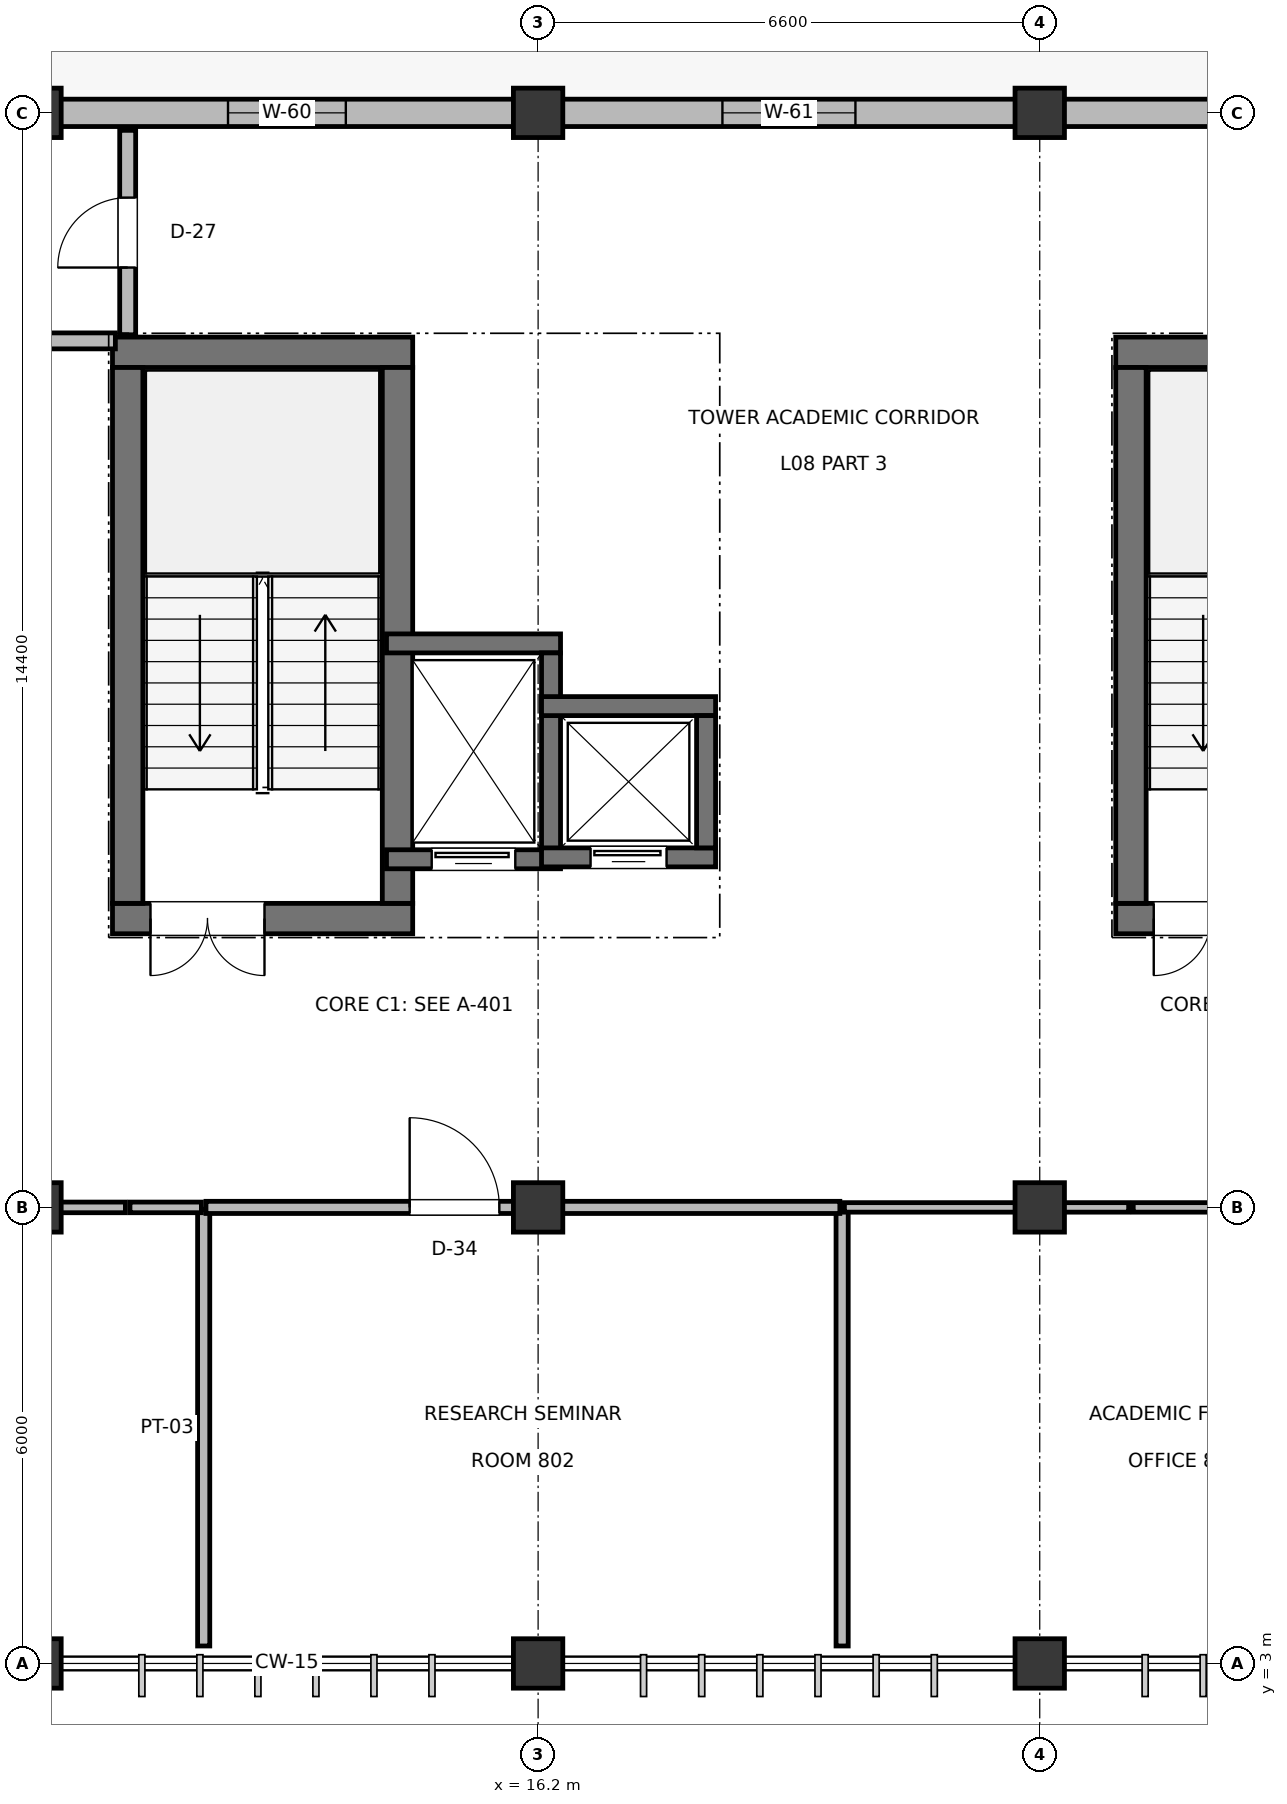
"""IFC4 building model, lengths in metres.
Left out: names, types, materials, properties, quantities, classifications, styles, units other than length and angle.
Written with IfcOpenShell. Run it as: python <this file> out.ifc"""

import sys

from ifc_helpers import new_model, si_unit, direction, frame, frame_2d, origin, origin_2d, place, context, subcontext, project, spatial, rectangle, extrude, element, fill, save


model = new_model("IFC4")
c1 = context("Model", 3, precision=1e-05, world=origin(), true_north=direction((0.0, 1.0)))
c2 = subcontext(c1, "Body", "Model", "MODEL_VIEW")
j1 = project(units=[si_unit("LENGTHUNIT", "METRE"), si_unit("PLANEANGLEUNIT", "RADIAN")], contexts=[c1])
p1 = place(None, origin())
s1 = spatial("IfcSite", under=j1, at=p1, CompositionType="ELEMENT")
p2 = place(p1, origin())
s2 = spatial("IfcBuilding", under=s1, at=p2, CompositionType="ELEMENT")
p3 = place(p2, frame((0.0, 0.0, 36.8)))
s3 = spatial("IfcBuildingStorey", under=s2, at=p3, CompositionType="ELEMENT", Elevation=36.8)
for number, where, z_axis, x_axis in (
    (1, (9.6, 3.0, 0.0), (0.0, 0.0, 1.0), (1.0, 0.0, 0.0)),
    (2, (9.6, 9.0, 0.0), (0.0, 0.0, 1.0), (1.0, 0.0, 0.0)),
    (3, (9.6, 23.4, 0.0), (0.0, 0.0, 1.0), (1.0, 0.0, 0.0)),
    (4, (16.2, 3.0, 0.0), (0.0, 0.0, 1.0), (1.0, 0.0, 0.0)),
    (5, (16.2, 9.0, 0.0), (0.0, 0.0, 1.0), (1.0, 0.0, 0.0)),
    (6, (16.2, 23.4, 0.0), (0.0, 0.0, 1.0), (1.0, 0.0, 0.0)),
    (7, (22.8, 3.0, 0.0), (0.0, 0.0, 1.0), (1.0, 0.0, 0.0)),
    (8, (22.8, 9.0, 0.0), (0.0, 0.0, 1.0), (1.0, 0.0, 0.0)),
    (9, (22.8, 23.4, 0.0), (0.0, 0.0, 1.0), (1.0, 0.0, 0.0)),
):
    element("IfcColumn", number, at=place(p3, frame(where, z_axis=z_axis, x_axis=x_axis)), inside=s3, PredefinedType="COLUMN", context=c2, shape_type="SweptSolid", body=[
        extrude(rectangle(XDim=0.65, YDim=0.65, at=origin_2d()), origin(), (0.0, 0.0, 1.0), 3.8),
    ])
p4 = place(p3, frame((9.905, 23.4, 0.0), z_axis=(0.0, 0.0, 1.0), x_axis=(1.0, 0.0, 0.0)))
e10 = element("IfcWall", 10, at=p4, inside=s3, PredefinedType="SOLIDWALL", context=c2, shape_type="SweptSolid", body=[
    extrude(rectangle(XDim=5.98, YDim=0.36, at=frame_2d((2.99, 0.0))), origin(), (0.0, 0.0, 1.0), 2.825),
])
p5 = place(p4, frame((2.215, 0.0, 0.9)))
e11 = element("IfcOpeningElement", 11, at=p5, cuts=e10, PredefinedType="OPENING", context=c2, shape_type="SweptSolid", body=[
    extrude(rectangle(XDim=1.55, YDim=1.75, at=frame_2d((0.775, 0.875))), frame((0.0, 0.19, 0.0), z_axis=(0.0, -1.0, 0.0), x_axis=(1.0, 0.0, 0.0)), (0.0, 0.0, 1.0), 0.38),
])
p6 = place(p3, frame((16.505, 23.4, 0.0), z_axis=(0.0, 0.0, 1.0), x_axis=(1.0, 0.0, 0.0)))
e12 = element("IfcWall", 12, at=p6, inside=s3, PredefinedType="SOLIDWALL", context=c2, shape_type="SweptSolid", body=[
    extrude(rectangle(XDim=5.99, YDim=0.36, at=frame_2d((2.995, 0.0))), origin(), (0.0, 0.0, 1.0), 2.615),
])
p7 = place(p6, frame((2.12, 0.0, 0.9)))
e13 = element("IfcOpeningElement", 13, at=p7, cuts=e12, PredefinedType="OPENING", context=c2, shape_type="SweptSolid", body=[
    extrude(rectangle(XDim=1.75, YDim=1.15, at=frame_2d((0.875, 0.575))), frame((0.0, 0.19, 0.0), z_axis=(0.0, -1.0, 0.0), x_axis=(1.0, 0.0, 0.0)), (0.0, 0.0, 1.0), 0.38),
])
p8 = place(p3, frame((23.105, 23.4, 0.0), z_axis=(0.0, 0.0, 1.0), x_axis=(1.0, 0.0, 0.0)))
e14 = element("IfcWall", 14, at=p8, inside=s3, PredefinedType="SOLIDWALL", context=c2, shape_type="SweptSolid", body=[
    extrude(rectangle(XDim=5.98, YDim=0.36, at=frame_2d((2.99, 0.0))), origin(), (0.0, 0.0, 1.0), 2.825),
])
p9 = place(p8, frame((2.115, 0.0, 0.9)))
e15 = element("IfcOpeningElement", 15, at=p9, cuts=e14, PredefinedType="OPENING", context=c2, shape_type="SweptSolid", body=[
    extrude(rectangle(XDim=1.75, YDim=1.35, at=frame_2d((0.875, 0.675))), frame((0.0, 0.19, 0.0), z_axis=(0.0, -1.0, 0.0), x_axis=(1.0, 0.0, 0.0)), (0.0, 0.0, 1.0), 0.38),
])
p10 = place(p3, frame((10.6, 12.8, 0.0), z_axis=(0.0, 0.0, 1.0), x_axis=(1.0, 0.0, 0.0)))
e16 = element("IfcWall", 16, at=p10, inside=s3, PredefinedType="SHEAR", context=c2, shape_type="SweptSolid", body=[
    extrude(rectangle(XDim=3.95, YDim=0.4, at=frame_2d((1.975, 0.0))), origin(), (0.0, 0.0, 1.0), 3.58),
])
p11 = place(p10, frame((0.5, 0.0, 0.0)))
e17 = element("IfcOpeningElement", 17, at=p11, cuts=e16, PredefinedType="OPENING", context=c2, shape_type="SweptSolid", body=[
    extrude(rectangle(XDim=1.5, YDim=2.2, at=frame_2d((0.75, 1.1))), frame((0.0, 0.21, 0.0), z_axis=(0.0, -1.0, 0.0), x_axis=(1.0, 0.0, 0.0)), (0.0, 0.0, 1.0), 0.42),
])
p12 = place(p3, frame((10.6, 20.25, 0.0), z_axis=(0.0, 0.0, 1.0), x_axis=(1.0, 0.0, 0.0)))
e18 = element("IfcWall", 18, at=p12, inside=s3, PredefinedType="SHEAR", context=c2, shape_type="SweptSolid", body=[
    extrude(rectangle(XDim=3.95, YDim=0.4, at=frame_2d((1.975, 0.0))), origin(), (0.0, 0.0, 1.0), 3.58),
])
for number, where, z_axis, x_axis in (
    (19, (10.8, 13.0, 0.0), (0.0, 0.0, 1.0), (0.0, 1.0, 0.0)),
    (20, (14.35, 13.0, 0.0), (0.0, 0.0, 1.0), (0.0, 1.0, 0.0)),
):
    element("IfcWall", number, at=place(p3, frame(where, z_axis=z_axis, x_axis=x_axis)), inside=s3, PredefinedType="SHEAR", context=c2, shape_type="SweptSolid", body=[
        extrude(rectangle(XDim=7.05, YDim=0.4, at=frame_2d((3.525, 0.0))), origin(), (0.0, 0.0, 1.0), 3.58),
    ])
p13 = place(p3, frame((14.205, 13.58, 0.0), z_axis=(0.0, 0.0, 1.0), x_axis=(1.0, 0.0, 0.0)))
e21 = element("IfcWall", 21, at=p13, inside=s3, PredefinedType="SHEAR", context=c2, shape_type="SweptSolid", body=[
    extrude(rectangle(XDim=2.29, YDim=0.25, at=frame_2d((1.145, 0.0))), origin(), (0.0, 0.0, 1.0), 3.56),
])
p14 = place(p13, frame((0.595, 0.0, 0.0)))
e22 = element("IfcOpeningElement", 22, at=p14, cuts=e21, PredefinedType="OPENING", context=c2, shape_type="SweptSolid", body=[
    extrude(rectangle(XDim=1.1, YDim=2.2, at=frame_2d((0.55, 1.1))), frame((0.0, 0.135, 0.0), z_axis=(0.0, -1.0, 0.0), x_axis=(1.0, 0.0, 0.0)), (0.0, 0.0, 1.0), 0.27),
])
p15 = place(p3, frame((14.205, 16.42, 0.0), z_axis=(0.0, 0.0, 1.0), x_axis=(1.0, 0.0, 0.0)))
e23 = element("IfcWall", 23, at=p15, inside=s3, PredefinedType="SHEAR", context=c2, shape_type="SweptSolid", body=[
    extrude(rectangle(XDim=2.29, YDim=0.25, at=frame_2d((1.145, 0.0))), origin(), (0.0, 0.0, 1.0), 3.56),
])
p16 = place(p3, frame((16.37, 13.705, 0.0), z_axis=(0.0, 0.0, 1.0), x_axis=(0.0, 1.0, 0.0)))
e24 = element("IfcWall", 24, at=p16, inside=s3, PredefinedType="SHEAR", context=c2, shape_type="SweptSolid", body=[
    extrude(rectangle(XDim=2.59, YDim=0.25, at=frame_2d((1.295, 0.0))), origin(), (0.0, 0.0, 1.0), 3.56),
])
p17 = place(p3, frame((16.245, 13.605, 0.0), z_axis=(0.0, 0.0, 1.0), x_axis=(1.0, 0.0, 0.0)))
e25 = element("IfcWall", 25, at=p17, inside=s3, PredefinedType="SHEAR", context=c2, shape_type="SweptSolid", body=[
    extrude(rectangle(XDim=2.29, YDim=0.25, at=frame_2d((1.145, 0.0))), origin(), (0.0, 0.0, 1.0), 3.56),
])
p18 = place(p17, frame((0.645, 0.0, 0.0)))
e26 = element("IfcOpeningElement", 26, at=p18, cuts=e25, PredefinedType="OPENING", context=c2, shape_type="SweptSolid", body=[
    extrude(rectangle(XDim=1.0, YDim=2.15, at=frame_2d((0.5, 1.075))), frame((0.0, 0.135, 0.0), z_axis=(0.0, -1.0, 0.0), x_axis=(1.0, 0.0, 0.0)), (0.0, 0.0, 1.0), 0.27),
])
p19 = place(p3, frame((16.245, 15.595, 0.0), z_axis=(0.0, 0.0, 1.0), x_axis=(1.0, 0.0, 0.0)))
e27 = element("IfcWall", 27, at=p19, inside=s3, PredefinedType="SHEAR", context=c2, shape_type="SweptSolid", body=[
    extrude(rectangle(XDim=2.29, YDim=0.25, at=frame_2d((1.145, 0.0))), origin(), (0.0, 0.0, 1.0), 3.56),
])
p20 = place(p3, frame((18.41, 13.73, 0.0), z_axis=(0.0, 0.0, 1.0), x_axis=(0.0, 1.0, 0.0)))
e28 = element("IfcWall", 28, at=p20, inside=s3, PredefinedType="SHEAR", context=c2, shape_type="SweptSolid", body=[
    extrude(rectangle(XDim=1.74, YDim=0.25, at=frame_2d((0.87, 0.0))), origin(), (0.0, 0.0, 1.0), 3.56),
])
p21 = place(p3, frame((23.8, 12.8, 0.0), z_axis=(0.0, 0.0, 1.0), x_axis=(1.0, 0.0, 0.0)))
e29 = element("IfcWall", 29, at=p21, inside=s3, PredefinedType="SHEAR", context=c2, shape_type="SweptSolid", body=[
    extrude(rectangle(XDim=3.95, YDim=0.4, at=frame_2d((1.975, 0.0))), origin(), (0.0, 0.0, 1.0), 3.58),
])
p22 = place(p21, frame((0.5, 0.0, 0.0)))
e30 = element("IfcOpeningElement", 30, at=p22, cuts=e29, PredefinedType="OPENING", context=c2, shape_type="SweptSolid", body=[
    extrude(rectangle(XDim=1.5, YDim=2.2, at=frame_2d((0.75, 1.1))), frame((0.0, 0.21, 0.0), z_axis=(0.0, -1.0, 0.0), x_axis=(1.0, 0.0, 0.0)), (0.0, 0.0, 1.0), 0.42),
])
p23 = place(p3, frame((23.8, 20.25, 0.0), z_axis=(0.0, 0.0, 1.0), x_axis=(1.0, 0.0, 0.0)))
e31 = element("IfcWall", 31, at=p23, inside=s3, PredefinedType="SHEAR", context=c2, shape_type="SweptSolid", body=[
    extrude(rectangle(XDim=3.95, YDim=0.4, at=frame_2d((1.975, 0.0))), origin(), (0.0, 0.0, 1.0), 3.58),
])
p24 = place(p3, frame((24.0, 13.0, 0.0), z_axis=(0.0, 0.0, 1.0), x_axis=(0.0, 1.0, 0.0)))
e32 = element("IfcWall", 32, at=p24, inside=s3, PredefinedType="SHEAR", context=c2, shape_type="SweptSolid", body=[
    extrude(rectangle(XDim=7.05, YDim=0.4, at=frame_2d((3.525, 0.0))), origin(), (0.0, 0.0, 1.0), 3.58),
])
p25 = place(p3, frame((11.8, 3.23, 0.0), z_axis=(0.0, 0.0, 1.0), x_axis=(0.0, 1.0, 0.0)))
e33 = element("IfcWall", 33, at=p25, inside=s3, PredefinedType="PARTITIONING", context=c2, shape_type="SweptSolid", body=[
    extrude(rectangle(XDim=5.74, YDim=0.16, at=frame_2d((2.87, 0.0))), origin(), (0.0, 0.0, 1.0), 2.825),
])
p26 = place(p3, frame((3.23, 9.0, 0.0), z_axis=(0.0, 0.0, 1.0), x_axis=(1.0, 0.0, 0.0)))
e34 = element("IfcWall", 34, at=p26, inside=s3, PredefinedType="PARTITIONING", context=c2, shape_type="SweptSolid", body=[
    extrude(rectangle(XDim=7.54, YDim=0.14, at=frame_2d((3.77, 0.0))), origin(), (0.0, 0.0, 1.0), 2.655),
])
p27 = place(p26, frame((3.195, 0.0, 0.0)))
e35 = element("IfcOpeningElement", 35, at=p27, cuts=e34, PredefinedType="OPENING", context=c2, shape_type="SweptSolid", body=[
    extrude(rectangle(XDim=1.15, YDim=2.15, at=frame_2d((0.575, 1.075))), frame((0.0, 0.08, 0.0), z_axis=(0.0, -1.0, 0.0), x_axis=(1.0, 0.0, 0.0)), (0.0, 0.0, 1.0), 0.16),
])
p28 = place(p3, frame((10.83, 9.0, 0.0), z_axis=(0.0, 0.0, 1.0), x_axis=(1.0, 0.0, 0.0)))
e36 = element("IfcWall", 36, at=p28, inside=s3, PredefinedType="PARTITIONING", context=c2, shape_type="SweptSolid", body=[
    extrude(rectangle(XDim=0.94, YDim=0.14, at=frame_2d((0.47, 0.0))), origin(), (0.0, 0.0, 1.0), 2.825),
])
p29 = place(p3, frame((20.2, 3.23, 0.0), z_axis=(0.0, 0.0, 1.0), x_axis=(0.0, 1.0, 0.0)))
e37 = element("IfcWall", 37, at=p29, inside=s3, PredefinedType="PARTITIONING", context=c2, shape_type="SweptSolid", body=[
    extrude(rectangle(XDim=5.74, YDim=0.16, at=frame_2d((2.87, 0.0))), origin(), (0.0, 0.0, 1.0), 2.615),
])
p30 = place(p3, frame((11.83, 9.0, 0.0), z_axis=(0.0, 0.0, 1.0), x_axis=(1.0, 0.0, 0.0)))
e38 = element("IfcWall", 38, at=p30, inside=s3, PredefinedType="PARTITIONING", context=c2, shape_type="SweptSolid", body=[
    extrude(rectangle(XDim=8.34, YDim=0.16, at=frame_2d((4.17, 0.0))), origin(), (0.0, 0.0, 1.0), 2.615),
])
p31 = place(p30, frame((2.68, 0.0, 0.0)))
e39 = element("IfcOpeningElement", 39, at=p31, cuts=e38, PredefinedType="OPENING", context=c2, shape_type="SweptSolid", body=[
    extrude(rectangle(XDim=1.18, YDim=2.2, at=frame_2d((0.59, 1.1))), frame((0.0, 0.09, 0.0), z_axis=(0.0, -1.0, 0.0), x_axis=(1.0, 0.0, 0.0)), (0.0, 0.0, 1.0), 0.18),
])
p32 = place(p3, frame((24.03, 9.0, 0.0), z_axis=(0.0, 0.0, 1.0), x_axis=(1.0, 0.0, 0.0)))
e40 = element("IfcWall", 40, at=p32, inside=s3, PredefinedType="PARTITIONING", context=c2, shape_type="SweptSolid", body=[
    extrude(rectangle(XDim=5.14, YDim=0.125, at=frame_2d((2.57, 0.0))), origin(), (0.0, 0.0, 1.0), 2.825),
])
p33 = place(p32, frame((2.07, 0.0, 0.0)))
e41 = element("IfcOpeningElement", 41, at=p33, cuts=e40, PredefinedType="OPENING", context=c2, shape_type="SweptSolid", body=[
    extrude(rectangle(XDim=1.0, YDim=2.15, at=frame_2d((0.5, 1.075))), frame((0.0, 0.073, 0.0), z_axis=(0.0, -1.0, 0.0), x_axis=(1.0, 0.0, 0.0)), (0.0, 0.0, 1.0), 0.145),
])
p34 = place(p3, frame((20.23, 9.0, 0.0), z_axis=(0.0, 0.0, 1.0), x_axis=(1.0, 0.0, 0.0)))
e42 = element("IfcWall", 42, at=p34, inside=s3, PredefinedType="PARTITIONING", context=c2, shape_type="SweptSolid", body=[
    extrude(rectangle(XDim=3.74, YDim=0.125, at=frame_2d((1.87, 0.0))), origin(), (0.0, 0.0, 1.0), 2.615),
])
p35 = place(p3, frame((8.23, 20.4, 0.0), z_axis=(0.0, 0.0, 1.0), x_axis=(1.0, 0.0, 0.0)))
e43 = element("IfcWall", 43, at=p35, inside=s3, PredefinedType="PLUMBINGWALL", context=c2, shape_type="SweptSolid", body=[
    extrude(rectangle(XDim=2.408, YDim=0.21, at=frame_2d((1.204, 0.0))), origin(), (0.0, 0.0, 1.0), 2.725),
])
p36 = place(p3, frame((10.8, 20.48, 0.0), z_axis=(0.0, 0.0, 1.0), x_axis=(0.0, 1.0, 0.0)))
e44 = element("IfcWall", 44, at=p36, inside=s3, PredefinedType="PLUMBINGWALL", context=c2, shape_type="SweptSolid", body=[
    extrude(rectangle(XDim=2.69, YDim=0.21, at=frame_2d((1.345, 0.0))), origin(), (0.0, 0.0, 1.0), 2.825),
])
p37 = place(p36, frame((0.885, 0.0, 0.0)))
e45 = element("IfcOpeningElement", 45, at=p37, cuts=e44, PredefinedType="OPENING", context=c2, shape_type="SweptSolid", body=[
    extrude(rectangle(XDim=0.92, YDim=2.1, at=frame_2d((0.46, 1.05))), frame((0.0, 0.115, 0.0), z_axis=(0.0, -1.0, 0.0), x_axis=(1.0, 0.0, 0.0)), (0.0, 0.0, 1.0), 0.23),
])
p38 = place(p5, origin())
e46 = element("IfcWindow", 46, at=p38, inside=s3, PartitioningType="DOUBLE_PANEL_VERTICAL", PredefinedType="WINDOW", context=c2, shape_type="SweptSolid", body=[
    extrude(rectangle(XDim=1.55, YDim=1.75, at=frame_2d((0.775, 0.875))), frame((0.0, 0.03, 0.0), z_axis=(0.0, -1.0, 0.0), x_axis=(1.0, 0.0, 0.0)), (0.0, 0.0, 1.0), 0.06),
])
fill(e11, e46)
p39 = place(p7, origin())
e47 = element("IfcWindow", 47, at=p39, inside=s3, PartitioningType="DOUBLE_PANEL_VERTICAL", PredefinedType="WINDOW", context=c2, shape_type="SweptSolid", body=[
    extrude(rectangle(XDim=1.75, YDim=1.15, at=frame_2d((0.875, 0.575))), frame((0.0, 0.03, 0.0), z_axis=(0.0, -1.0, 0.0), x_axis=(1.0, 0.0, 0.0)), (0.0, 0.0, 1.0), 0.06),
])
fill(e13, e47)
p40 = place(p11, frame((1.5, 0.0, 0.0), z_axis=(0.0, 0.0, 1.0), x_axis=(-1.0, 0.0, 0.0)))
e48 = element("IfcDoor", 48, at=p40, inside=s3, OperationType="DOUBLE_DOOR_SINGLE_SWING", PredefinedType="DOOR", context=c2, shape_type="SweptSolid", body=[
    extrude(rectangle(XDim=1.5, YDim=2.2, at=frame_2d((0.75, 1.1))), frame((0.0, 0.025, 0.0), z_axis=(0.0, -1.0, 0.0), x_axis=(1.0, 0.0, 0.0)), (0.0, 0.0, 1.0), 0.05),
])
fill(e17, e48)
p41 = place(p14, frame((1.1, 0.0, 0.0), z_axis=(0.0, 0.0, 1.0), x_axis=(-1.0, 0.0, 0.0)))
e49 = element("IfcDoor", 49, at=p41, inside=s3, OperationType="SLIDING_TO_LEFT", PredefinedType="DOOR", context=c2, shape_type="SweptSolid", body=[
    extrude(rectangle(XDim=1.1, YDim=2.2, at=frame_2d((0.55, 1.1))), frame((0.0, 0.025, 0.0), z_axis=(0.0, -1.0, 0.0), x_axis=(1.0, 0.0, 0.0)), (0.0, 0.0, 1.0), 0.05),
])
fill(e22, e49)
p42 = place(p18, frame((1.0, 0.0, 0.0), z_axis=(0.0, 0.0, 1.0), x_axis=(-1.0, 0.0, 0.0)))
e50 = element("IfcDoor", 50, at=p42, inside=s3, OperationType="SLIDING_TO_LEFT", PredefinedType="DOOR", context=c2, shape_type="SweptSolid", body=[
    extrude(rectangle(XDim=1.0, YDim=2.15, at=frame_2d((0.5, 1.075))), frame((0.0, 0.025, 0.0), z_axis=(0.0, -1.0, 0.0), x_axis=(1.0, 0.0, 0.0)), (0.0, 0.0, 1.0), 0.05),
])
fill(e26, e50)
p43 = place(p22, frame((1.5, 0.0, 0.0), z_axis=(0.0, 0.0, 1.0), x_axis=(-1.0, 0.0, 0.0)))
e51 = element("IfcDoor", 51, at=p43, inside=s3, OperationType="DOUBLE_DOOR_SINGLE_SWING", PredefinedType="DOOR", context=c2, shape_type="SweptSolid", body=[
    extrude(rectangle(XDim=1.5, YDim=2.2, at=frame_2d((0.75, 1.1))), frame((0.0, 0.025, 0.0), z_axis=(0.0, -1.0, 0.0), x_axis=(1.0, 0.0, 0.0)), (0.0, 0.0, 1.0), 0.05),
])
fill(e30, e51)
p44 = place(p31, origin())
e52 = element("IfcDoor", 52, at=p44, inside=s3, OperationType="SINGLE_SWING_LEFT", PredefinedType="DOOR", context=c2, shape_type="SweptSolid", body=[
    extrude(rectangle(XDim=1.18, YDim=2.2, at=frame_2d((0.59, 1.1))), frame((0.0, 0.025, 0.0), z_axis=(0.0, -1.0, 0.0), x_axis=(1.0, 0.0, 0.0)), (0.0, 0.0, 1.0), 0.05),
])
fill(e39, e52)
p45 = place(p37, origin())
e53 = element("IfcDoor", 53, at=p45, inside=s3, OperationType="SINGLE_SWING_LEFT", PredefinedType="DOOR", context=c2, shape_type="SweptSolid", body=[
    extrude(rectangle(XDim=0.92, YDim=2.1, at=frame_2d((0.46, 1.05))), frame((0.0, 0.025, 0.0), z_axis=(0.0, -1.0, 0.0), x_axis=(1.0, 0.0, 0.0)), (0.0, 0.0, 1.0), 0.05),
])
fill(e45, e53)
save(model, sys.argv[1])
